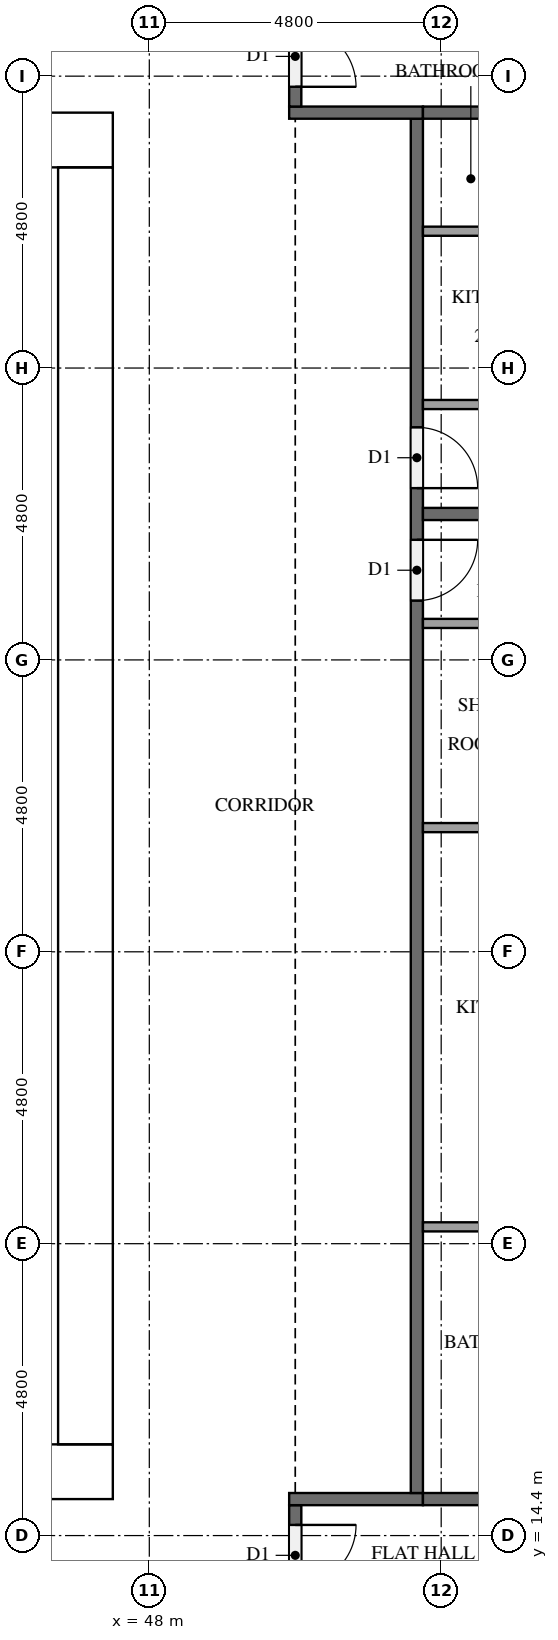
"""IFC4 building model, lengths in metres.
Left out: names, types, materials, properties, quantities, classifications, styles, units other than length and angle.
Written with IfcOpenShell. Run it as: python <this file> out.ifc"""

import sys

from ifc_helpers import new_model, si_unit, direction, frame, frame_2d, origin, place, context, subcontext, project, spatial, rectangle, extrude, element, fill, save


model = new_model("IFC4")
c1 = context("Model", 3, precision=1e-05, world=origin(), true_north=direction((0.0, 1.0)))
c2 = subcontext(c1, "Body", "Model", "MODEL_VIEW")
j1 = project(units=[si_unit("LENGTHUNIT", "METRE"), si_unit("PLANEANGLEUNIT", "RADIAN")], contexts=[c1])
p1 = place(None, origin())
s1 = spatial("IfcSite", under=j1, at=p1, CompositionType="ELEMENT")
p2 = place(p1, origin())
s2 = spatial("IfcBuilding", under=s1, at=p2, CompositionType="ELEMENT")
p3 = place(p2, frame((0.0, 0.0, 106.7)))
s3 = spatial("IfcBuildingStorey", under=s2, at=p3, CompositionType="ELEMENT", Elevation=106.7)
p4 = place(p3, frame((15.0, 15.45, 0.0), z_axis=(0.0, 0.0, 1.0), x_axis=(1.0, 0.0, 0.0)))
e1 = element("IfcWall", 1, at=p4, inside=s3, PredefinedType="SHEAR", context=c2, shape_type="SweptSolid", body=[
    extrude(rectangle(XDim=32.4, YDim=0.9, at=frame_2d((16.2, 0.0))), origin(), (0.0, 0.0, 1.0), 3.2),
])
p5 = place(p4, frame((15.3, 0.0, 0.0)))
e2 = element("IfcOpeningElement", 2, at=p5, cuts=e1, PredefinedType="OPENING", context=c2, shape_type="SweptSolid", body=[
    extrude(rectangle(XDim=1.8, YDim=2.1, at=frame_2d((0.9, 1.05))), frame((0.0, 0.46, 0.0), z_axis=(0.0, -1.0, 0.0), x_axis=(1.0, 0.0, 0.0)), (0.0, 0.0, 1.0), 0.92),
])
p6 = place(p3, frame((15.0, 37.35, 0.0), z_axis=(0.0, 0.0, 1.0), x_axis=(1.0, 0.0, 0.0)))
e3 = element("IfcWall", 3, at=p6, inside=s3, PredefinedType="SHEAR", context=c2, shape_type="SweptSolid", body=[
    extrude(rectangle(XDim=32.4, YDim=0.9, at=frame_2d((16.2, 0.0))), origin(), (0.0, 0.0, 1.0), 3.2),
])
p7 = place(p6, frame((15.3, 0.0, 0.0)))
e4 = element("IfcOpeningElement", 4, at=p7, cuts=e3, PredefinedType="OPENING", context=c2, shape_type="SweptSolid", body=[
    extrude(rectangle(XDim=1.8, YDim=2.1, at=frame_2d((0.9, 1.05))), frame((0.0, 0.46, 0.0), z_axis=(0.0, -1.0, 0.0), x_axis=(1.0, 0.0, 0.0)), (0.0, 0.0, 1.0), 0.92),
])
p8 = place(p6, frame((1.794, 0.0, 0.0)))
e5 = element("IfcOpeningElement", 5, at=p8, cuts=e3, PredefinedType="OPENING", context=c2, shape_type="SweptSolid", body=[
    extrude(rectangle(XDim=1.0, YDim=2.1, at=frame_2d((0.5, 1.05))), frame((0.0, 0.46, 0.0), z_axis=(0.0, -1.0, 0.0), x_axis=(1.0, 0.0, 0.0)), (0.0, 0.0, 1.0), 0.92),
])
p9 = place(p6, frame((5.331, 0.0, 0.0)))
e6 = element("IfcOpeningElement", 6, at=p9, cuts=e3, PredefinedType="OPENING", context=c2, shape_type="SweptSolid", body=[
    extrude(rectangle(XDim=1.0, YDim=2.1, at=frame_2d((0.5, 1.05))), frame((0.0, 0.46, 0.0), z_axis=(0.0, -1.0, 0.0), x_axis=(1.0, 0.0, 0.0)), (0.0, 0.0, 1.0), 0.92),
])
p10 = place(p3, frame((46.95, 15.9, 0.0), z_axis=(0.0, 0.0, 1.0), x_axis=(0.0, 1.0, 0.0)))
e7 = element("IfcWall", 7, at=p10, inside=s3, PredefinedType="SHEAR", context=c2, shape_type="SweptSolid", body=[
    extrude(rectangle(XDim=21.0, YDim=0.9, at=frame_2d((10.5, 0.0))), origin(), (0.0, 0.0, 1.0), 3.2),
])
p11 = place(p10, frame((10.2, 0.0, 0.0)))
e8 = element("IfcOpeningElement", 8, at=p11, cuts=e7, PredefinedType="OPENING", context=c2, shape_type="SweptSolid", body=[
    extrude(rectangle(XDim=1.2, YDim=2.1, at=frame_2d((0.6, 1.05))), frame((0.0, 0.46, 0.0), z_axis=(0.0, -1.0, 0.0), x_axis=(1.0, 0.0, 0.0)), (0.0, 0.0, 1.0), 0.92),
])
p12 = place(p3, frame((50.4, 14.9, 0.0), z_axis=(0.0, 0.0, 1.0), x_axis=(0.0, -1.0, 0.0)))
e9 = element("IfcWall", 9, at=p12, inside=s3, PredefinedType="PARTITIONING", context=c2, shape_type="SweptSolid", body=[
    extrude(rectangle(XDim=2.8, YDim=0.2, at=frame_2d((1.4, 0.0))), origin(), (0.0, 0.0, 1.0), 3.2),
])
p13 = place(p12, frame((0.325, 0.0, 0.0)))
e10 = element("IfcOpeningElement", 10, at=p13, cuts=e9, PredefinedType="OPENING", context=c2, shape_type="SweptSolid", body=[
    extrude(rectangle(XDim=1.0, YDim=2.1, at=frame_2d((0.5, 1.05))), frame((0.0, 0.11, 0.0), z_axis=(0.0, -1.0, 0.0), x_axis=(1.0, 0.0, 0.0)), (0.0, 0.0, 1.0), 0.22),
])
p14 = place(p3, frame((50.3, 15.0, 0.0), z_axis=(0.0, 0.0, 1.0), x_axis=(1.0, 0.0, 0.0)))
e11 = element("IfcWall", 11, at=p14, inside=s3, PredefinedType="PARTITIONING", context=c2, shape_type="SweptSolid", body=[
    extrude(rectangle(XDim=2.2, YDim=0.2, at=frame_2d((1.1, 0.0))), origin(), (0.0, 0.0, 1.0), 3.2),
])
p15 = place(p3, frame((52.4, 37.7, 0.0), z_axis=(0.0, 0.0, 1.0), x_axis=(0.0, -1.0, 0.0)))
e12 = element("IfcWall", 12, at=p15, inside=s3, PredefinedType="PARTITIONING", context=c2, shape_type="SweptSolid", body=[
    extrude(rectangle(XDim=22.6, YDim=0.2, at=frame_2d((11.3, 0.0))), origin(), (0.0, 0.0, 1.0), 3.2),
])
p16 = place(p15, frame((6.925, 0.0, 0.0)))
e13 = element("IfcOpeningElement", 13, at=p16, cuts=e12, PredefinedType="OPENING", context=c2, shape_type="SweptSolid", body=[
    extrude(rectangle(XDim=1.0, YDim=2.1, at=frame_2d((0.5, 1.05))), frame((0.0, 0.11, 0.0), z_axis=(0.0, -1.0, 0.0), x_axis=(1.0, 0.0, 0.0)), (0.0, 0.0, 1.0), 0.22),
])
p17 = place(p15, frame((5.075, 0.0, 0.0)))
e14 = element("IfcOpeningElement", 14, at=p17, cuts=e12, PredefinedType="OPENING", context=c2, shape_type="SweptSolid", body=[
    extrude(rectangle(XDim=1.0, YDim=2.1, at=frame_2d((0.5, 1.05))), frame((0.0, 0.11, 0.0), z_axis=(0.0, -1.0, 0.0), x_axis=(1.0, 0.0, 0.0)), (0.0, 0.0, 1.0), 0.22),
])
p18 = place(p3, frame((52.5, 37.8, 0.0), z_axis=(0.0, 0.0, 1.0), x_axis=(-1.0, 0.0, 0.0)))
e15 = element("IfcWall", 15, at=p18, inside=s3, PredefinedType="PARTITIONING", context=c2, shape_type="SweptSolid", body=[
    extrude(rectangle(XDim=2.2, YDim=0.2, at=frame_2d((1.1, 0.0))), origin(), (0.0, 0.0, 1.0), 3.2),
])
p19 = place(p3, frame((50.4, 40.7, 0.0), z_axis=(0.0, 0.0, 1.0), x_axis=(0.0, -1.0, 0.0)))
e16 = element("IfcWall", 16, at=p19, inside=s3, PredefinedType="PARTITIONING", context=c2, shape_type="SweptSolid", body=[
    extrude(rectangle(XDim=2.8, YDim=0.2, at=frame_2d((1.4, 0.0))), origin(), (0.0, 0.0, 1.0), 3.2),
])
p20 = place(p19, frame((1.475, 0.0, 0.0)))
e17 = element("IfcOpeningElement", 17, at=p20, cuts=e16, PredefinedType="OPENING", context=c2, shape_type="SweptSolid", body=[
    extrude(rectangle(XDim=1.0, YDim=2.1, at=frame_2d((0.5, 1.05))), frame((0.0, 0.11, 0.0), z_axis=(0.0, -1.0, 0.0), x_axis=(1.0, 0.0, 0.0)), (0.0, 0.0, 1.0), 0.22),
])
for number, where, z_axis, x_axis in (
    (18, (52.5, 15.0, 0.0), (0.0, 0.0, 1.0), (1.0, 0.0, 0.0)),
    (19, (52.5, 31.2, 0.0), (0.0, 0.0, 1.0), (1.0, 0.0, 0.0)),
):
    element("IfcWall", number, at=place(p3, frame(where, z_axis=z_axis, x_axis=x_axis)), inside=s3, PredefinedType="PARTITIONING", context=c2, shape_type="SweptSolid", body=[
        extrude(rectangle(XDim=9.8, YDim=0.2, at=frame_2d((4.9, 0.0))), origin(), (0.0, 0.0, 1.0), 3.2),
    ])
p21 = place(p3, frame((52.5, 37.8, 0.0), z_axis=(0.0, 0.0, 1.0), x_axis=(1.0, 0.0, 0.0)))
e20 = element("IfcWall", 20, at=p21, inside=s3, PredefinedType="PARTITIONING", context=c2, shape_type="SweptSolid", body=[
    extrude(rectangle(XDim=9.475, YDim=0.2, at=frame_2d((4.738, 0.0))), origin(), (0.0, 0.0, 1.0), 3.2),
])
for number, where, z_axis, x_axis in (
    (21, (52.5, 26.042, 0.0), (0.0, 0.0, 1.0), (1.0, 0.0, 0.0)),
    (22, (52.5, 19.477, 0.0), (0.0, 0.0, 1.0), (1.0, 0.0, 0.0)),
):
    element("IfcWall", number, at=place(p3, frame(where, z_axis=z_axis, x_axis=x_axis)), inside=s3, PredefinedType="PARTITIONING", context=c2, shape_type="SweptSolid", body=[
        extrude(rectangle(XDim=2.475, YDim=0.15, at=frame_2d((1.238, 0.0))), origin(), (0.0, 0.0, 1.0), 3.2),
    ])
p22 = place(p3, frame((52.5, 29.4, 0.0), z_axis=(0.0, 0.0, 1.0), x_axis=(1.0, 0.0, 0.0)))
e23 = element("IfcWall", 23, at=p22, inside=s3, PredefinedType="PARTITIONING", context=c2, shape_type="SweptSolid", body=[
    extrude(rectangle(XDim=2.625, YDim=0.15, at=frame_2d((1.312, 0.0))), origin(), (0.0, 0.0, 1.0), 3.2),
])
p23 = place(p3, frame((52.5, 35.85, 0.0), z_axis=(0.0, 0.0, 1.0), x_axis=(1.0, 0.0, 0.0)))
e24 = element("IfcWall", 24, at=p23, inside=s3, PredefinedType="PARTITIONING", context=c2, shape_type="SweptSolid", body=[
    extrude(rectangle(XDim=2.325, YDim=0.15, at=frame_2d((1.163, 0.0))), origin(), (0.0, 0.0, 1.0), 3.2),
])
p24 = place(p3, frame((52.5, 33.0, 0.0), z_axis=(0.0, 0.0, 1.0), x_axis=(1.0, 0.0, 0.0)))
e25 = element("IfcWall", 25, at=p24, inside=s3, PredefinedType="PARTITIONING", context=c2, shape_type="SweptSolid", body=[
    extrude(rectangle(XDim=2.475, YDim=0.15, at=frame_2d((1.238, 0.0))), origin(), (0.0, 0.0, 1.0), 3.2),
])
p25 = place(p11, origin())
e26 = element("IfcDoor", 26, at=p25, inside=s3, OperationType="SINGLE_SWING_LEFT", PredefinedType="DOOR", context=c2, shape_type="SweptSolid", body=[
    extrude(rectangle(XDim=1.2, YDim=2.1, at=frame_2d((0.6, 1.05))), frame((0.0, 0.025, 0.0), z_axis=(0.0, -1.0, 0.0), x_axis=(1.0, 0.0, 0.0)), (0.0, 0.0, 1.0), 0.05),
])
fill(e8, e26)
p26 = place(p13, origin())
e27 = element("IfcDoor", 27, at=p26, inside=s3, OperationType="SINGLE_SWING_LEFT", PredefinedType="DOOR", context=c2, shape_type="SweptSolid", body=[
    extrude(rectangle(XDim=1.0, YDim=2.1, at=frame_2d((0.5, 1.05))), frame((0.0, 0.025, 0.0), z_axis=(0.0, -1.0, 0.0), x_axis=(1.0, 0.0, 0.0)), (0.0, 0.0, 1.0), 0.05),
])
fill(e10, e27)
p27 = place(p16, origin())
e28 = element("IfcDoor", 28, at=p27, inside=s3, OperationType="SINGLE_SWING_LEFT", PredefinedType="DOOR", context=c2, shape_type="SweptSolid", body=[
    extrude(rectangle(XDim=1.0, YDim=2.1, at=frame_2d((0.5, 1.05))), frame((0.0, 0.025, 0.0), z_axis=(0.0, -1.0, 0.0), x_axis=(1.0, 0.0, 0.0)), (0.0, 0.0, 1.0), 0.05),
])
fill(e13, e28)
p28 = place(p17, origin())
e29 = element("IfcDoor", 29, at=p28, inside=s3, OperationType="SINGLE_SWING_RIGHT", PredefinedType="DOOR", context=c2, shape_type="SweptSolid", body=[
    extrude(rectangle(XDim=1.0, YDim=2.1, at=frame_2d((0.5, 1.05))), frame((0.0, 0.025, 0.0), z_axis=(0.0, -1.0, 0.0), x_axis=(1.0, 0.0, 0.0)), (0.0, 0.0, 1.0), 0.05),
])
fill(e14, e29)
p29 = place(p20, origin())
e30 = element("IfcDoor", 30, at=p29, inside=s3, OperationType="SINGLE_SWING_RIGHT", PredefinedType="DOOR", context=c2, shape_type="SweptSolid", body=[
    extrude(rectangle(XDim=1.0, YDim=2.1, at=frame_2d((0.5, 1.05))), frame((0.0, 0.025, 0.0), z_axis=(0.0, -1.0, 0.0), x_axis=(1.0, 0.0, 0.0)), (0.0, 0.0, 1.0), 0.05),
])
fill(e17, e30)
save(model, sys.argv[1])
